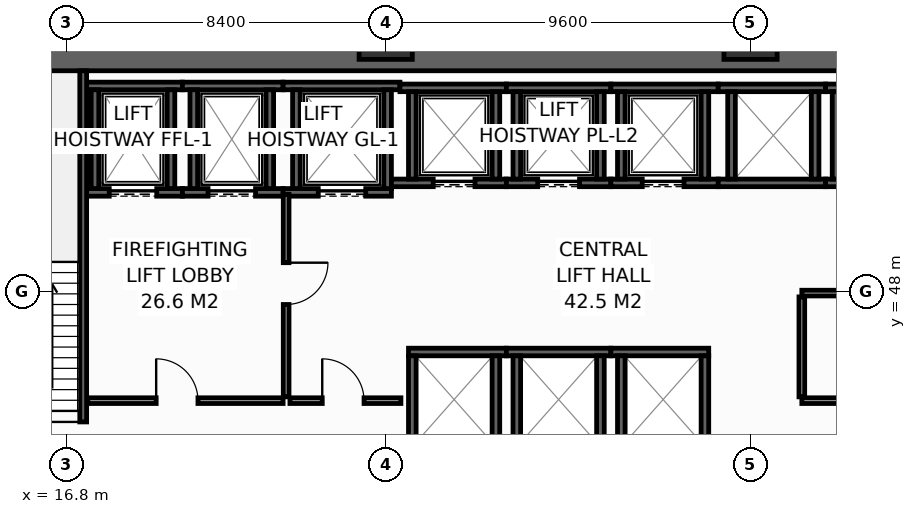
"""IFC4 building model, lengths in metres.
Left out: names, types, materials, properties, quantities, classifications, styles, units other than length and angle.
Written with IfcOpenShell. Run it as: python <this file> out.ifc"""

import sys

from ifc_helpers import new_model, si_unit, direction, frame, frame_2d, origin, origin_2d, place, context, subcontext, project, spatial, rectangle, hollow_rectangle, extrude, element, fill, save


model = new_model("IFC4")
c1 = context("Model", 3, precision=1e-05, world=origin(), true_north=direction((0.0, 1.0)))
c2 = subcontext(c1, "Body", "Model", "MODEL_VIEW")
j1 = project(units=[si_unit("LENGTHUNIT", "METRE"), si_unit("PLANEANGLEUNIT", "RADIAN")], contexts=[c1])
p1 = place(None, origin())
s1 = spatial("IfcSite", under=j1, at=p1, CompositionType="ELEMENT")
p2 = place(p1, origin())
s2 = spatial("IfcBuilding", under=s1, at=p2, CompositionType="ELEMENT")
p3 = place(p2, frame((0.0, 0.0, 22.2)))
s3 = spatial("IfcBuildingStorey", under=s2, at=p3, CompositionType="ELEMENT", Elevation=22.2)
p4 = place(p3, frame((13.5, 54.1, 0.0), z_axis=(0.0, 0.0, 1.0), x_axis=(1.0, 0.0, 0.0)))
e1 = element("IfcWall", 1, at=p4, inside=s3, PredefinedType="SHEAR", context=c2, shape_type="SweptSolid", body=[
    extrude(rectangle(XDim=32.9, YDim=0.6, at=frame_2d((16.45, 0.0))), origin(), (0.0, 0.0, 1.0), 5.15),
])
for number, where, z_axis, x_axis in (
    (2, (25.2, 54.8, 0.0), (0.0, 0.0, 1.0), (1.0, 0.0, 0.0)),
    (3, (34.8, 54.8, 0.0), (0.0, 0.0, 1.0), (1.0, 0.0, 0.0)),
):
    element("IfcColumn", number, at=place(p3, frame(where, z_axis=z_axis, x_axis=x_axis)), inside=s3, PredefinedType="COLUMN", context=c2, shape_type="SweptSolid", body=[
        extrude(hollow_rectangle(XDim=1.4, YDim=1.4, WallThickness=0.065, at=origin_2d()), origin(), (0.0, 0.0, 1.0), 5.4),
    ])
p5 = place(p3, frame((17.33, 50.6, 0.0), z_axis=(0.0, 0.0, 1.0), x_axis=(1.0, 0.0, 0.0)))
e4 = element("IfcWall", 4, at=p5, inside=s3, PredefinedType="SHEAR", context=c2, shape_type="SweptSolid", body=[
    extrude(rectangle(XDim=2.52, YDim=0.2, at=frame_2d((1.26, 0.0))), origin(), (0.0, 0.0, 1.0), 5.15),
])
p6 = place(p5, frame((0.595, 0.0, 0.0)))
e5 = element("IfcOpeningElement", 5, at=p6, cuts=e4, PredefinedType="OPENING", context=c2, shape_type="SweptSolid", body=[
    extrude(rectangle(XDim=1.25, YDim=2.3, at=frame_2d((0.625, 1.15))), frame((0.0, 0.11, 0.0), z_axis=(0.0, -1.0, 0.0), x_axis=(1.0, 0.0, 0.0)), (0.0, 0.0, 1.0), 0.22),
])
p7 = place(p3, frame((17.33, 53.4, 0.0), z_axis=(0.0, 0.0, 1.0), x_axis=(1.0, 0.0, 0.0)))
e6 = element("IfcWall", 6, at=p7, inside=s3, PredefinedType="SHEAR", context=c2, shape_type="SweptSolid", body=[
    extrude(rectangle(XDim=2.52, YDim=0.2, at=frame_2d((1.26, 0.0))), origin(), (0.0, 0.0, 1.0), 5.15),
])
for number, where, z_axis, x_axis in (
    (7, (17.55, 50.7, 0.0), (0.0, 0.0, 1.0), (0.0, 1.0, 0.0)),
    (8, (19.55, 50.7, 0.0), (0.0, 0.0, 1.0), (0.0, 1.0, 0.0)),
):
    element("IfcWall", number, at=place(p3, frame(where, z_axis=z_axis, x_axis=x_axis)), inside=s3, PredefinedType="SHEAR", context=c2, shape_type="SweptSolid", body=[
        extrude(rectangle(XDim=2.6, YDim=0.2, at=frame_2d((1.3, 0.0))), origin(), (0.0, 0.0, 1.0), 5.15),
    ])
p8 = place(p3, frame((19.85, 50.6, 0.0), z_axis=(0.0, 0.0, 1.0), x_axis=(1.0, 0.0, 0.0)))
e9 = element("IfcWall", 9, at=p8, inside=s3, PredefinedType="SHEAR", context=c2, shape_type="SweptSolid", body=[
    extrude(rectangle(XDim=2.65, YDim=0.2, at=frame_2d((1.325, 0.0))), origin(), (0.0, 0.0, 1.0), 5.15),
])
p9 = place(p8, frame((0.675, 0.0, 0.0)))
e10 = element("IfcOpeningElement", 10, at=p9, cuts=e9, PredefinedType="OPENING", context=c2, shape_type="SweptSolid", body=[
    extrude(rectangle(XDim=1.25, YDim=2.3, at=frame_2d((0.625, 1.15))), frame((0.0, 0.11, 0.0), z_axis=(0.0, -1.0, 0.0), x_axis=(1.0, 0.0, 0.0)), (0.0, 0.0, 1.0), 0.22),
])
p10 = place(p3, frame((19.85, 53.4, 0.0), z_axis=(0.0, 0.0, 1.0), x_axis=(1.0, 0.0, 0.0)))
e11 = element("IfcWall", 11, at=p10, inside=s3, PredefinedType="SHEAR", context=c2, shape_type="SweptSolid", body=[
    extrude(rectangle(XDim=2.65, YDim=0.2, at=frame_2d((1.325, 0.0))), origin(), (0.0, 0.0, 1.0), 5.15),
])
for number, where, z_axis, x_axis in (
    (12, (20.15, 50.7, 0.0), (0.0, 0.0, 1.0), (0.0, 1.0, 0.0)),
    (13, (22.15, 50.7, 0.0), (0.0, 0.0, 1.0), (0.0, 1.0, 0.0)),
):
    element("IfcWall", number, at=place(p3, frame(where, z_axis=z_axis, x_axis=x_axis)), inside=s3, PredefinedType="SHEAR", context=c2, shape_type="SweptSolid", body=[
        extrude(rectangle(XDim=2.6, YDim=0.2, at=frame_2d((1.3, 0.0))), origin(), (0.0, 0.0, 1.0), 5.15),
    ])
p11 = place(p3, frame((22.5, 50.6, 0.0), z_axis=(0.0, 0.0, 1.0), x_axis=(1.0, 0.0, 0.0)))
e14 = element("IfcWall", 14, at=p11, inside=s3, PredefinedType="SHEAR", context=c2, shape_type="SweptSolid", body=[
    extrude(rectangle(XDim=2.85, YDim=0.2, at=frame_2d((1.425, 0.0))), origin(), (0.0, 0.0, 1.0), 5.15),
])
p12 = place(p11, frame((0.925, 0.0, 0.0)))
e15 = element("IfcOpeningElement", 15, at=p12, cuts=e14, PredefinedType="OPENING", context=c2, shape_type="SweptSolid", body=[
    extrude(rectangle(XDim=1.25, YDim=2.3, at=frame_2d((0.625, 1.15))), frame((0.0, 0.11, 0.0), z_axis=(0.0, -1.0, 0.0), x_axis=(1.0, 0.0, 0.0)), (0.0, 0.0, 1.0), 0.22),
])
p13 = place(p3, frame((22.5, 53.4, 0.0), z_axis=(0.0, 0.0, 1.0), x_axis=(1.0, 0.0, 0.0)))
e16 = element("IfcWall", 16, at=p13, inside=s3, PredefinedType="SHEAR", context=c2, shape_type="SweptSolid", body=[
    extrude(rectangle(XDim=3.075, YDim=0.2, at=frame_2d((1.538, 0.0))), origin(), (0.0, 0.0, 1.0), 5.15),
])
for number, where, z_axis, x_axis in (
    (17, (22.85, 50.7, 0.0), (0.0, 0.0, 1.0), (0.0, 1.0, 0.0)),
    (18, (25.25, 50.7, 0.0), (0.0, 0.0, 1.0), (0.0, 1.0, 0.0)),
):
    element("IfcWall", number, at=place(p3, frame(where, z_axis=z_axis, x_axis=x_axis)), inside=s3, PredefinedType="SHEAR", context=c2, shape_type="SweptSolid", body=[
        extrude(rectangle(XDim=2.6, YDim=0.2, at=frame_2d((1.3, 0.0))), origin(), (0.0, 0.0, 1.0), 5.15),
    ])
p14 = place(p3, frame((25.35, 50.85, 0.0), z_axis=(0.0, 0.0, 1.0), x_axis=(1.0, 0.0, 0.0)))
e19 = element("IfcWall", 19, at=p14, inside=s3, PredefinedType="SHEAR", context=c2, shape_type="SweptSolid", body=[
    extrude(rectangle(XDim=3.025, YDim=0.2, at=frame_2d((1.512, 0.0))), origin(), (0.0, 0.0, 1.0), 5.15),
])
p15 = place(p14, frame((1.1, 0.0, 0.0)))
e20 = element("IfcOpeningElement", 20, at=p15, cuts=e19, PredefinedType="OPENING", context=c2, shape_type="SweptSolid", body=[
    extrude(rectangle(XDim=1.1, YDim=2.2, at=frame_2d((0.55, 1.1))), frame((0.0, 0.11, 0.0), z_axis=(0.0, -1.0, 0.0), x_axis=(1.0, 0.0, 0.0)), (0.0, 0.0, 1.0), 0.22),
])
p16 = place(p3, frame((25.575, 53.35, 0.0), z_axis=(0.0, 0.0, 1.0), x_axis=(1.0, 0.0, 0.0)))
e21 = element("IfcWall", 21, at=p16, inside=s3, PredefinedType="SHEAR", context=c2, shape_type="SweptSolid", body=[
    extrude(rectangle(XDim=2.8, YDim=0.2, at=frame_2d((1.4, 0.0))), origin(), (0.0, 0.0, 1.0), 5.15),
])
for number, where, z_axis, x_axis in (
    (22, (25.9, 50.95, 0.0), (0.0, 0.0, 1.0), (0.0, 1.0, 0.0)),
    (23, (28.1, 50.95, 0.0), (0.0, 0.0, 1.0), (0.0, 1.0, 0.0)),
):
    element("IfcWall", number, at=place(p3, frame(where, z_axis=z_axis, x_axis=x_axis)), inside=s3, PredefinedType="SHEAR", context=c2, shape_type="SweptSolid", body=[
        extrude(rectangle(XDim=2.3, YDim=0.2, at=frame_2d((1.15, 0.0))), origin(), (0.0, 0.0, 1.0), 5.15),
    ])
p17 = place(p3, frame((28.375, 50.85, 0.0), z_axis=(0.0, 0.0, 1.0), x_axis=(1.0, 0.0, 0.0)))
e24 = element("IfcWall", 24, at=p17, inside=s3, PredefinedType="SHEAR", context=c2, shape_type="SweptSolid", body=[
    extrude(rectangle(XDim=2.75, YDim=0.2, at=frame_2d((1.375, 0.0))), origin(), (0.0, 0.0, 1.0), 5.15),
])
p18 = place(p17, frame((0.825, 0.0, 0.0)))
e25 = element("IfcOpeningElement", 25, at=p18, cuts=e24, PredefinedType="OPENING", context=c2, shape_type="SweptSolid", body=[
    extrude(rectangle(XDim=1.1, YDim=2.2, at=frame_2d((0.55, 1.1))), frame((0.0, 0.11, 0.0), z_axis=(0.0, -1.0, 0.0), x_axis=(1.0, 0.0, 0.0)), (0.0, 0.0, 1.0), 0.22),
])
p19 = place(p3, frame((28.375, 53.35, 0.0), z_axis=(0.0, 0.0, 1.0), x_axis=(1.0, 0.0, 0.0)))
e26 = element("IfcWall", 26, at=p19, inside=s3, PredefinedType="SHEAR", context=c2, shape_type="SweptSolid", body=[
    extrude(rectangle(XDim=2.75, YDim=0.2, at=frame_2d((1.375, 0.0))), origin(), (0.0, 0.0, 1.0), 5.15),
])
for number, where, z_axis, x_axis in (
    (27, (28.65, 50.95, 0.0), (0.0, 0.0, 1.0), (0.0, 1.0, 0.0)),
    (28, (30.85, 50.95, 0.0), (0.0, 0.0, 1.0), (0.0, 1.0, 0.0)),
):
    element("IfcWall", number, at=place(p3, frame(where, z_axis=z_axis, x_axis=x_axis)), inside=s3, PredefinedType="SHEAR", context=c2, shape_type="SweptSolid", body=[
        extrude(rectangle(XDim=2.3, YDim=0.2, at=frame_2d((1.15, 0.0))), origin(), (0.0, 0.0, 1.0), 5.15),
    ])
p20 = place(p3, frame((31.125, 50.85, 0.0), z_axis=(0.0, 0.0, 1.0), x_axis=(1.0, 0.0, 0.0)))
e29 = element("IfcWall", 29, at=p20, inside=s3, PredefinedType="SHEAR", context=c2, shape_type="SweptSolid", body=[
    extrude(rectangle(XDim=2.825, YDim=0.2, at=frame_2d((1.413, 0.0))), origin(), (0.0, 0.0, 1.0), 5.15),
])
p21 = place(p20, frame((0.825, 0.0, 0.0)))
e30 = element("IfcOpeningElement", 30, at=p21, cuts=e29, PredefinedType="OPENING", context=c2, shape_type="SweptSolid", body=[
    extrude(rectangle(XDim=1.1, YDim=2.2, at=frame_2d((0.55, 1.1))), frame((0.0, 0.11, 0.0), z_axis=(0.0, -1.0, 0.0), x_axis=(1.0, 0.0, 0.0)), (0.0, 0.0, 1.0), 0.22),
])
p22 = place(p3, frame((31.125, 53.35, 0.0), z_axis=(0.0, 0.0, 1.0), x_axis=(1.0, 0.0, 0.0)))
e31 = element("IfcWall", 31, at=p22, inside=s3, PredefinedType="SHEAR", context=c2, shape_type="SweptSolid", body=[
    extrude(rectangle(XDim=2.825, YDim=0.2, at=frame_2d((1.413, 0.0))), origin(), (0.0, 0.0, 1.0), 5.15),
])
for number, where, z_axis, x_axis in (
    (32, (31.4, 50.95, 0.0), (0.0, 0.0, 1.0), (0.0, 1.0, 0.0)),
    (33, (33.6, 50.95, 0.0), (0.0, 0.0, 1.0), (0.0, 1.0, 0.0)),
):
    element("IfcWall", number, at=place(p3, frame(where, z_axis=z_axis, x_axis=x_axis)), inside=s3, PredefinedType="SHEAR", context=c2, shape_type="SweptSolid", body=[
        extrude(rectangle(XDim=2.3, YDim=0.2, at=frame_2d((1.15, 0.0))), origin(), (0.0, 0.0, 1.0), 5.15),
    ])
p23 = place(p3, frame((25.8, 46.4, 0.0), z_axis=(0.0, 0.0, 1.0), x_axis=(1.0, 0.0, 0.0)))
e34 = element("IfcWall", 34, at=p23, inside=s3, PredefinedType="SHEAR", context=c2, shape_type="SweptSolid", body=[
    extrude(rectangle(XDim=2.575, YDim=0.2, at=frame_2d((1.288, 0.0))), origin(), (0.0, 0.0, 1.0), 5.15),
])
for number, where, z_axis, x_axis in (
    (35, (25.9, 44.0, 0.0), (0.0, 0.0, 1.0), (0.0, 1.0, 0.0)),
    (36, (28.1, 44.0, 0.0), (0.0, 0.0, 1.0), (0.0, 1.0, 0.0)),
):
    element("IfcWall", number, at=place(p3, frame(where, z_axis=z_axis, x_axis=x_axis)), inside=s3, PredefinedType="SHEAR", context=c2, shape_type="SweptSolid", body=[
        extrude(rectangle(XDim=2.3, YDim=0.2, at=frame_2d((1.15, 0.0))), origin(), (0.0, 0.0, 1.0), 5.15),
    ])
p24 = place(p3, frame((28.375, 46.4, 0.0), z_axis=(0.0, 0.0, 1.0), x_axis=(1.0, 0.0, 0.0)))
e37 = element("IfcWall", 37, at=p24, inside=s3, PredefinedType="SHEAR", context=c2, shape_type="SweptSolid", body=[
    extrude(rectangle(XDim=2.75, YDim=0.2, at=frame_2d((1.375, 0.0))), origin(), (0.0, 0.0, 1.0), 5.15),
])
for number, where, z_axis, x_axis in (
    (38, (28.65, 44.0, 0.0), (0.0, 0.0, 1.0), (0.0, 1.0, 0.0)),
    (39, (30.85, 44.0, 0.0), (0.0, 0.0, 1.0), (0.0, 1.0, 0.0)),
):
    element("IfcWall", number, at=place(p3, frame(where, z_axis=z_axis, x_axis=x_axis)), inside=s3, PredefinedType="SHEAR", context=c2, shape_type="SweptSolid", body=[
        extrude(rectangle(XDim=2.3, YDim=0.2, at=frame_2d((1.15, 0.0))), origin(), (0.0, 0.0, 1.0), 5.15),
    ])
p25 = place(p3, frame((31.125, 46.4, 0.0), z_axis=(0.0, 0.0, 1.0), x_axis=(1.0, 0.0, 0.0)))
e40 = element("IfcWall", 40, at=p25, inside=s3, PredefinedType="SHEAR", context=c2, shape_type="SweptSolid", body=[
    extrude(rectangle(XDim=2.575, YDim=0.2, at=frame_2d((1.288, 0.0))), origin(), (0.0, 0.0, 1.0), 5.15),
])
for number, where, z_axis, x_axis in (
    (41, (31.4, 44.0, 0.0), (0.0, 0.0, 1.0), (0.0, 1.0, 0.0)),
    (42, (33.6, 44.0, 0.0), (0.0, 0.0, 1.0), (0.0, 1.0, 0.0)),
):
    element("IfcWall", number, at=place(p3, frame(where, z_axis=z_axis, x_axis=x_axis)), inside=s3, PredefinedType="SHEAR", context=c2, shape_type="SweptSolid", body=[
        extrude(rectangle(XDim=2.3, YDim=0.2, at=frame_2d((1.15, 0.0))), origin(), (0.0, 0.0, 1.0), 5.15),
    ])
for number, where, z_axis, x_axis in (
    (43, (33.95, 50.85, 0.0), (0.0, 0.0, 1.0), (1.0, 0.0, 0.0)),
    (44, (33.95, 53.35, 0.0), (0.0, 0.0, 1.0), (1.0, 0.0, 0.0)),
):
    element("IfcWall", number, at=place(p3, frame(where, z_axis=z_axis, x_axis=x_axis)), inside=s3, PredefinedType="SHEAR", context=c2, shape_type="SweptSolid", body=[
        extrude(rectangle(XDim=2.825, YDim=0.2, at=frame_2d((1.413, 0.0))), origin(), (0.0, 0.0, 1.0), 5.15),
    ])
for number, where, z_axis, x_axis in (
    (45, (34.3, 50.95, 0.0), (0.0, 0.0, 1.0), (0.0, 1.0, 0.0)),
    (46, (36.5, 50.95, 0.0), (0.0, 0.0, 1.0), (0.0, 1.0, 0.0)),
):
    element("IfcWall", number, at=place(p3, frame(where, z_axis=z_axis, x_axis=x_axis)), inside=s3, PredefinedType="SHEAR", context=c2, shape_type="SweptSolid", body=[
        extrude(rectangle(XDim=2.3, YDim=0.2, at=frame_2d((1.15, 0.0))), origin(), (0.0, 0.0, 1.0), 5.15),
    ])
for number, where, z_axis, x_axis in (
    (47, (36.775, 50.85, 0.0), (0.0, 0.0, 1.0), (1.0, 0.0, 0.0)),
    (48, (36.775, 53.35, 0.0), (0.0, 0.0, 1.0), (1.0, 0.0, 0.0)),
):
    element("IfcWall", number, at=place(p3, frame(where, z_axis=z_axis, x_axis=x_axis)), inside=s3, PredefinedType="SHEAR", context=c2, shape_type="SweptSolid", body=[
        extrude(rectangle(XDim=2.75, YDim=0.2, at=frame_2d((1.375, 0.0))), origin(), (0.0, 0.0, 1.0), 5.15),
    ])
p26 = place(p3, frame((37.05, 50.95, 0.0), z_axis=(0.0, 0.0, 1.0), x_axis=(0.0, 1.0, 0.0)))
e49 = element("IfcWall", 49, at=p26, inside=s3, PredefinedType="SHEAR", context=c2, shape_type="SweptSolid", body=[
    extrude(rectangle(XDim=2.3, YDim=0.2, at=frame_2d((1.15, 0.0))), origin(), (0.0, 0.0, 1.0), 5.15),
])
p27 = place(p3, frame((17.24, 43.4, 0.0), z_axis=(0.0, 0.0, 1.0), x_axis=(0.0, 1.0, 0.0)))
e50 = element("IfcWall", 50, at=p27, inside=s3, PredefinedType="SHEAR", context=c2, shape_type="SweptSolid", body=[
    extrude(rectangle(XDim=10.4, YDim=0.18, at=frame_2d((5.2, 0.0))), origin(), (0.0, 0.0, 1.0), 5.15),
])
p28 = place(p27, frame((0.16, 0.0, 0.0)))
e51 = element("IfcOpeningElement", 51, at=p28, cuts=e50, PredefinedType="OPENING", context=c2, shape_type="SweptSolid", body=[
    extrude(rectangle(XDim=1.0, YDim=2.15, at=frame_2d((0.5, 1.075))), frame((0.0, 0.1, 0.0), z_axis=(0.0, -1.0, 0.0), x_axis=(1.0, 0.0, 0.0)), (0.0, 0.0, 1.0), 0.2),
])
p29 = place(p3, frame((17.36, 45.12, 0.0), z_axis=(0.0, 0.0, 1.0), x_axis=(1.0, 0.0, 0.0)))
e52 = element("IfcWall", 52, at=p29, inside=s3, PredefinedType="PARTITIONING", context=c2, shape_type="SweptSolid", body=[
    extrude(rectangle(XDim=5.14, YDim=0.15, at=frame_2d((2.57, 0.0))), origin(), (0.0, 0.0, 1.0), 5.15),
])
p30 = place(p29, frame((1.8, 0.0, 0.0)))
e53 = element("IfcOpeningElement", 53, at=p30, cuts=e52, PredefinedType="OPENING", context=c2, shape_type="SweptSolid", body=[
    extrude(rectangle(XDim=1.1, YDim=2.15, at=frame_2d((0.55, 1.075))), frame((0.0, 0.085, 0.0), z_axis=(0.0, -1.0, 0.0), x_axis=(1.0, 0.0, 0.0)), (0.0, 0.0, 1.0), 0.17),
])
p31 = place(p3, frame((22.58, 50.55, 0.0), z_axis=(0.0, 0.0, 1.0), x_axis=(0.0, -1.0, 0.0)))
e54 = element("IfcWall", 54, at=p31, inside=s3, PredefinedType="PARTITIONING", context=c2, shape_type="SweptSolid", body=[
    extrude(rectangle(XDim=5.33, YDim=0.15, at=frame_2d((2.665, 0.0))), origin(), (0.0, 0.0, 1.0), 5.15),
])
p32 = place(p31, frame((1.8, 0.0, 0.0)))
e55 = element("IfcOpeningElement", 55, at=p32, cuts=e54, PredefinedType="OPENING", context=c2, shape_type="SweptSolid", body=[
    extrude(rectangle(XDim=1.1, YDim=2.15, at=frame_2d((0.55, 1.075))), frame((0.0, 0.085, 0.0), z_axis=(0.0, -1.0, 0.0), x_axis=(1.0, 0.0, 0.0)), (0.0, 0.0, 1.0), 0.17),
])
p33 = place(p3, frame((22.68, 45.12, 0.0), z_axis=(0.0, 0.0, 1.0), x_axis=(1.0, 0.0, 0.0)))
e56 = element("IfcWall", 56, at=p33, inside=s3, PredefinedType="PARTITIONING", context=c2, shape_type="SweptSolid", body=[
    extrude(rectangle(XDim=2.92, YDim=0.15, at=frame_2d((1.46, 0.0))), origin(), (0.0, 0.0, 1.0), 5.15),
])
p34 = place(p33, frame((0.85, 0.0, 0.0)))
e57 = element("IfcOpeningElement", 57, at=p34, cuts=e56, PredefinedType="OPENING", context=c2, shape_type="SweptSolid", body=[
    extrude(rectangle(XDim=1.1, YDim=2.15, at=frame_2d((0.55, 1.075))), frame((0.0, 0.085, 0.0), z_axis=(0.0, -1.0, 0.0), x_axis=(1.0, 0.0, 0.0)), (0.0, 0.0, 1.0), 0.17),
])
p35 = place(p3, frame((36.15, 45.12, 0.0), z_axis=(0.0, 0.0, 1.0), x_axis=(1.0, 0.0, 0.0)))
e58 = element("IfcWall", 58, at=p35, inside=s3, PredefinedType="PARTITIONING", context=c2, shape_type="SweptSolid", body=[
    extrude(rectangle(XDim=6.35, YDim=0.15, at=frame_2d((3.175, 0.0))), origin(), (0.0, 0.0, 1.0), 5.15),
])
p36 = place(p35, frame((1.05, 0.0, 0.0)))
e59 = element("IfcOpeningElement", 59, at=p36, cuts=e58, PredefinedType="OPENING", context=c2, shape_type="SweptSolid", body=[
    extrude(rectangle(XDim=0.95, YDim=2.15, at=frame_2d((0.475, 1.075))), frame((0.0, 0.085, 0.0), z_axis=(0.0, -1.0, 0.0), x_axis=(1.0, 0.0, 0.0)), (0.0, 0.0, 1.0), 0.17),
])
p37 = place(p35, frame((4.25, 0.0, 0.0)))
e60 = element("IfcOpeningElement", 60, at=p37, cuts=e58, PredefinedType="OPENING", context=c2, shape_type="SweptSolid", body=[
    extrude(rectangle(XDim=0.95, YDim=2.15, at=frame_2d((0.475, 1.075))), frame((0.0, 0.085, 0.0), z_axis=(0.0, -1.0, 0.0), x_axis=(1.0, 0.0, 0.0)), (0.0, 0.0, 1.0), 0.17),
])
p38 = place(p3, frame((36.15, 47.95, 0.0), z_axis=(0.0, 0.0, 1.0), x_axis=(1.0, 0.0, 0.0)))
e61 = element("IfcWall", 61, at=p38, inside=s3, PredefinedType="PARTITIONING", context=c2, shape_type="SweptSolid", body=[
    extrude(rectangle(XDim=6.35, YDim=0.15, at=frame_2d((3.175, 0.0))), origin(), (0.0, 0.0, 1.0), 5.15),
])
p39 = place(p3, frame((36.15, 45.22, 0.0), z_axis=(0.0, 0.0, 1.0), x_axis=(0.0, 1.0, 0.0)))
e62 = element("IfcWall", 62, at=p39, inside=s3, PredefinedType="PARTITIONING", context=c2, shape_type="SweptSolid", body=[
    extrude(rectangle(XDim=2.63, YDim=0.15, at=frame_2d((1.315, 0.0))), origin(), (0.0, 0.0, 1.0), 5.15),
])
p40 = place(p6, origin())
e63 = element("IfcDoor", 63, at=p40, inside=s3, OperationType="SLIDING_TO_LEFT", PredefinedType="DOOR", context=c2, shape_type="SweptSolid", body=[
    extrude(rectangle(XDim=1.25, YDim=2.3, at=frame_2d((0.625, 1.15))), frame((0.0, 0.025, 0.0), z_axis=(0.0, -1.0, 0.0), x_axis=(1.0, 0.0, 0.0)), (0.0, 0.0, 1.0), 0.05),
])
fill(e5, e63)
p41 = place(p9, origin())
e64 = element("IfcDoor", 64, at=p41, inside=s3, OperationType="SLIDING_TO_LEFT", PredefinedType="DOOR", context=c2, shape_type="SweptSolid", body=[
    extrude(rectangle(XDim=1.25, YDim=2.3, at=frame_2d((0.625, 1.15))), frame((0.0, 0.025, 0.0), z_axis=(0.0, -1.0, 0.0), x_axis=(1.0, 0.0, 0.0)), (0.0, 0.0, 1.0), 0.05),
])
fill(e10, e64)
p42 = place(p12, origin())
e65 = element("IfcDoor", 65, at=p42, inside=s3, OperationType="SLIDING_TO_LEFT", PredefinedType="DOOR", context=c2, shape_type="SweptSolid", body=[
    extrude(rectangle(XDim=1.25, YDim=2.3, at=frame_2d((0.625, 1.15))), frame((0.0, 0.025, 0.0), z_axis=(0.0, -1.0, 0.0), x_axis=(1.0, 0.0, 0.0)), (0.0, 0.0, 1.0), 0.05),
])
fill(e15, e65)
p43 = place(p15, origin())
e66 = element("IfcDoor", 66, at=p43, inside=s3, OperationType="SLIDING_TO_LEFT", PredefinedType="DOOR", context=c2, shape_type="SweptSolid", body=[
    extrude(rectangle(XDim=1.1, YDim=2.2, at=frame_2d((0.55, 1.1))), frame((0.0, 0.025, 0.0), z_axis=(0.0, -1.0, 0.0), x_axis=(1.0, 0.0, 0.0)), (0.0, 0.0, 1.0), 0.05),
])
fill(e20, e66)
p44 = place(p18, origin())
e67 = element("IfcDoor", 67, at=p44, inside=s3, OperationType="SLIDING_TO_LEFT", PredefinedType="DOOR", context=c2, shape_type="SweptSolid", body=[
    extrude(rectangle(XDim=1.1, YDim=2.2, at=frame_2d((0.55, 1.1))), frame((0.0, 0.025, 0.0), z_axis=(0.0, -1.0, 0.0), x_axis=(1.0, 0.0, 0.0)), (0.0, 0.0, 1.0), 0.05),
])
fill(e25, e67)
p45 = place(p21, origin())
e68 = element("IfcDoor", 68, at=p45, inside=s3, OperationType="SLIDING_TO_LEFT", PredefinedType="DOOR", context=c2, shape_type="SweptSolid", body=[
    extrude(rectangle(XDim=1.1, YDim=2.2, at=frame_2d((0.55, 1.1))), frame((0.0, 0.025, 0.0), z_axis=(0.0, -1.0, 0.0), x_axis=(1.0, 0.0, 0.0)), (0.0, 0.0, 1.0), 0.05),
])
fill(e30, e68)
p46 = place(p28, origin())
e69 = element("IfcDoor", 69, at=p46, inside=s3, OperationType="SINGLE_SWING_RIGHT", PredefinedType="DOOR", context=c2, shape_type="SweptSolid", body=[
    extrude(rectangle(XDim=1.0, YDim=2.15, at=frame_2d((0.5, 1.075))), frame((0.0, 0.025, 0.0), z_axis=(0.0, -1.0, 0.0), x_axis=(1.0, 0.0, 0.0)), (0.0, 0.0, 1.0), 0.05),
])
fill(e51, e69)
p47 = place(p30, origin())
e70 = element("IfcDoor", 70, at=p47, inside=s3, OperationType="SINGLE_SWING_LEFT", PredefinedType="DOOR", context=c2, shape_type="SweptSolid", body=[
    extrude(rectangle(XDim=1.1, YDim=2.15, at=frame_2d((0.55, 1.075))), frame((0.0, 0.025, 0.0), z_axis=(0.0, -1.0, 0.0), x_axis=(1.0, 0.0, 0.0)), (0.0, 0.0, 1.0), 0.05),
])
fill(e53, e70)
p48 = place(p32, origin())
e71 = element("IfcDoor", 71, at=p48, inside=s3, OperationType="SINGLE_SWING_LEFT", PredefinedType="DOOR", context=c2, shape_type="SweptSolid", body=[
    extrude(rectangle(XDim=1.1, YDim=2.15, at=frame_2d((0.55, 1.075))), frame((0.0, 0.025, 0.0), z_axis=(0.0, -1.0, 0.0), x_axis=(1.0, 0.0, 0.0)), (0.0, 0.0, 1.0), 0.05),
])
fill(e55, e71)
p49 = place(p34, origin())
e72 = element("IfcDoor", 72, at=p49, inside=s3, OperationType="SINGLE_SWING_LEFT", PredefinedType="DOOR", context=c2, shape_type="SweptSolid", body=[
    extrude(rectangle(XDim=1.1, YDim=2.15, at=frame_2d((0.55, 1.075))), frame((0.0, 0.025, 0.0), z_axis=(0.0, -1.0, 0.0), x_axis=(1.0, 0.0, 0.0)), (0.0, 0.0, 1.0), 0.05),
])
fill(e57, e72)
save(model, sys.argv[1])
